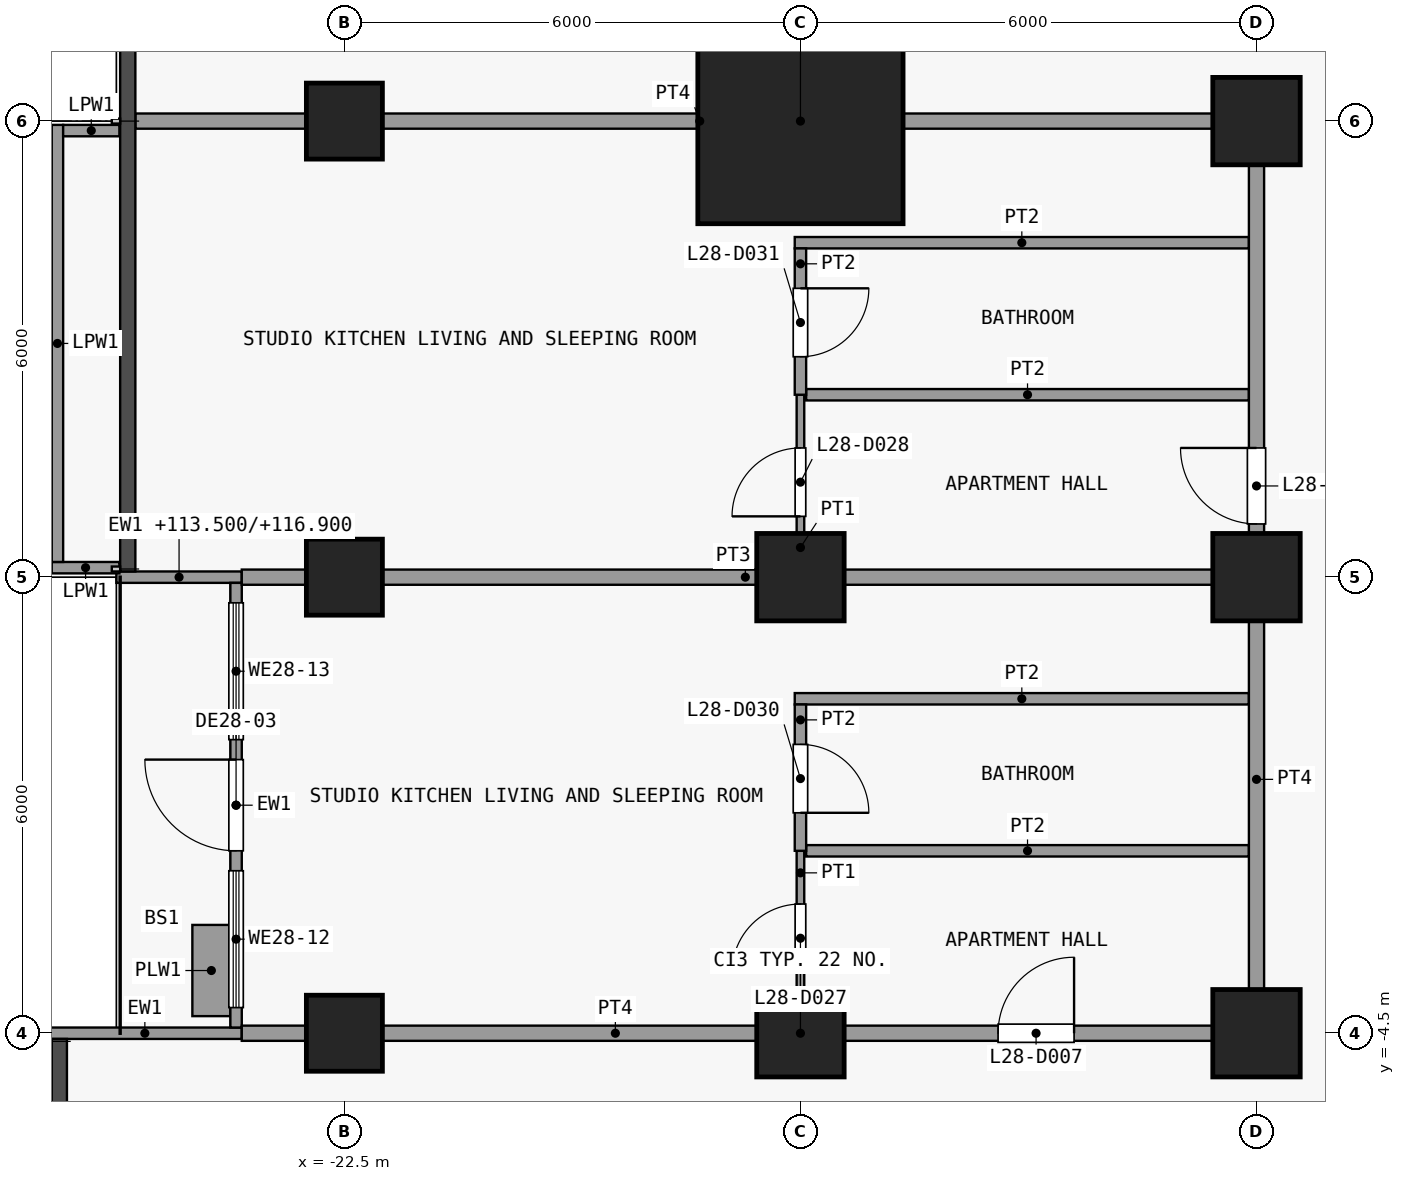
"""IFC4 building model, lengths in metres.
Left out: names, types, materials, properties, quantities, classifications, styles, units other than length and angle.
Written with IfcOpenShell. Run it as: python <this file> out.ifc"""

import sys

from ifc_helpers import new_model, si_unit, direction, frame, frame_2d, origin, origin_2d, place, context, subcontext, project, spatial, rectangle, extrude, element, fill, save


model = new_model("IFC4")
c1 = context("Model", 3, precision=1e-05, world=origin(), true_north=direction((0.0, 1.0)))
c2 = subcontext(c1, "Body", "Model", "MODEL_VIEW")
j1 = project(units=[si_unit("LENGTHUNIT", "METRE"), si_unit("PLANEANGLEUNIT", "RADIAN")], contexts=[c1])
p1 = place(None, origin())
s1 = spatial("IfcSite", under=j1, at=p1, CompositionType="ELEMENT")
p2 = place(p1, origin())
s2 = spatial("IfcBuilding", under=s1, at=p2, CompositionType="ELEMENT")
p3 = place(p2, frame((0.0, 0.0, 113.5)))
s3 = spatial("IfcBuildingStorey", under=s2, at=p3, CompositionType="ELEMENT", Elevation=113.5)
for number, where, z_axis, x_axis in (
    (1, (-22.5, -4.5, 0.0), (0.0, 0.0, 1.0), (1.0, 0.0, 0.0)),
    (2, (-22.5, 1.5, 0.0), (0.0, 0.0, 1.0), (1.0, 0.0, 0.0)),
    (3, (-22.5, 7.5, 0.0), (0.0, 0.0, 1.0), (1.0, 0.0, 0.0)),
):
    element("IfcColumn", number, at=place(p3, frame(where, z_axis=z_axis, x_axis=x_axis)), inside=s3, PredefinedType="COLUMN", context=c2, shape_type="SweptSolid", body=[
        extrude(rectangle(XDim=1.0, YDim=1.0, at=origin_2d()), origin(), (0.0, 0.0, 1.0), 3.6),
    ])
for number, where, z_axis, x_axis in (
    (4, (-16.5, -4.5, 0.0), (0.0, 0.0, 1.0), (1.0, 0.0, 0.0)),
    (5, (-16.5, 1.5, 0.0), (0.0, 0.0, 1.0), (1.0, 0.0, 0.0)),
):
    element("IfcColumn", number, at=place(p3, frame(where, z_axis=z_axis, x_axis=x_axis)), inside=s3, PredefinedType="COLUMN", context=c2, shape_type="SweptSolid", body=[
        extrude(rectangle(XDim=1.15, YDim=1.15, at=origin_2d()), origin(), (0.0, 0.0, 1.0), 3.6),
    ])
p4 = place(p3, frame((-16.5, 7.5, 0.0), z_axis=(0.0, 0.0, 1.0), x_axis=(1.0, 0.0, 0.0)))
e6 = element("IfcColumn", 6, at=p4, inside=s3, PredefinedType="COLUMN", context=c2, shape_type="SweptSolid", body=[
    extrude(rectangle(XDim=2.7, YDim=2.7, at=origin_2d()), origin(), (0.0, 0.0, 1.0), 3.6),
])
for number, where, z_axis, x_axis in (
    (7, (-10.5, -4.5, 0.0), (0.0, 0.0, 1.0), (1.0, 0.0, 0.0)),
    (8, (-10.5, 1.5, 0.0), (0.0, 0.0, 1.0), (1.0, 0.0, 0.0)),
    (9, (-10.5, 7.5, 0.0), (0.0, 0.0, 1.0), (1.0, 0.0, 0.0)),
):
    element("IfcColumn", number, at=place(p3, frame(where, z_axis=z_axis, x_axis=x_axis)), inside=s3, PredefinedType="COLUMN", context=c2, shape_type="SweptSolid", body=[
        extrude(rectangle(XDim=1.15, YDim=1.15, at=origin_2d()), origin(), (0.0, 0.0, 1.0), 3.6),
    ])
p5 = place(p3, frame((-23.85, -4.5, 0.0), z_axis=(0.0, 0.0, 1.0), x_axis=(-1.0, 0.0, 0.0)))
e10 = element("IfcWall", 10, at=p5, inside=s3, PredefinedType="SOLIDWALL", context=c2, shape_type="SweptSolid", body=[
    extrude(rectangle(XDim=2.55, YDim=0.15, at=frame_2d((1.275, 0.0))), origin(), (0.0, 0.0, 1.0), 3.3),
])
p6 = place(p3, frame((-23.85, 1.5, 0.0), z_axis=(0.0, 0.0, 1.0), x_axis=(-1.0, 0.0, 0.0)))
e11 = element("IfcWall", 11, at=p6, inside=s3, PredefinedType="SOLIDWALL", context=c2, shape_type="SweptSolid", body=[
    extrude(rectangle(XDim=1.65, YDim=0.15, at=frame_2d((0.825, 0.0))), origin(), (0.0, 0.0, 1.0), 3.4),
])
p7 = place(p3, frame((-23.925, -4.425, 0.0), z_axis=(0.0, 0.0, 1.0), x_axis=(0.0, 1.0, 0.0)))
e12 = element("IfcWall", 12, at=p7, inside=s3, PredefinedType="SOLIDWALL", context=c2, shape_type="SweptSolid", body=[
    extrude(rectangle(XDim=5.85, YDim=0.15, at=frame_2d((2.925, 0.0))), origin(), (0.0, 0.0, 1.0), 3.3),
])
p8 = place(p7, frame((2.325, 0.0, 0.0)))
e13 = element("IfcOpeningElement", 13, at=p8, cuts=e12, PredefinedType="OPENING", context=c2, shape_type="SweptSolid", body=[
    extrude(rectangle(XDim=1.2, YDim=2.4, at=frame_2d((0.6, 1.2))), frame((0.0, 0.085, 0.0), z_axis=(0.0, -1.0, 0.0), x_axis=(1.0, 0.0, 0.0)), (0.0, 0.0, 1.0), 0.17),
])
p9 = place(p7, frame((0.262, 0.0, 0.9)))
e14 = element("IfcOpeningElement", 14, at=p9, cuts=e12, PredefinedType="OPENING", context=c2, shape_type="SweptSolid", body=[
    extrude(rectangle(XDim=1.8, YDim=2.1, at=frame_2d((0.9, 1.05))), frame((0.0, 0.085, 0.0), z_axis=(0.0, -1.0, 0.0), x_axis=(1.0, 0.0, 0.0)), (0.0, 0.0, 1.0), 0.17),
])
p10 = place(p7, frame((3.788, 0.0, 0.9)))
e15 = element("IfcOpeningElement", 15, at=p10, cuts=e12, PredefinedType="OPENING", context=c2, shape_type="SweptSolid", body=[
    extrude(rectangle(XDim=1.8, YDim=2.1, at=frame_2d((0.9, 1.05))), frame((0.0, 0.085, 0.0), z_axis=(0.0, -1.0, 0.0), x_axis=(1.0, 0.0, 0.0)), (0.0, 0.0, 1.0), 0.17),
])
p11 = place(p3, frame((-24.25, -4.275, 0.0), z_axis=(0.0, 0.0, 1.0), x_axis=(0.0, 1.0, 0.0)))
e16 = element("IfcWall", 16, at=p11, inside=s3, PredefinedType="USERDEFINED", context=c2, shape_type="SweptSolid", body=[
    extrude(rectangle(XDim=1.2, YDim=0.5, at=frame_2d((0.6, 0.0))), origin(), (0.0, 0.0, 1.0), 0.9),
])
p12 = place(p3, frame((-25.46, 1.625, 0.0), z_axis=(0.0, 0.0, 1.0), x_axis=(-1.0, 0.0, 0.0)))
e17 = element("IfcWall", 17, at=p12, inside=s3, PredefinedType="PARAPET", context=c2, shape_type="SweptSolid", body=[
    extrude(rectangle(XDim=0.89, YDim=0.15, at=frame_2d((0.445, 0.0))), origin(), (0.0, 0.0, 1.0), 1.15),
])
p13 = place(p3, frame((-26.275, 1.7, 0.0), z_axis=(0.0, 0.0, 1.0), x_axis=(0.0, 1.0, 0.0)))
e18 = element("IfcWall", 18, at=p13, inside=s3, PredefinedType="PARAPET", context=c2, shape_type="SweptSolid", body=[
    extrude(rectangle(XDim=5.75, YDim=0.15, at=frame_2d((2.875, 0.0))), origin(), (0.0, 0.0, 1.0), 1.15),
])
p14 = place(p3, frame((-26.2, 7.375, 0.0), z_axis=(0.0, 0.0, 1.0), x_axis=(1.0, 0.0, 0.0)))
e19 = element("IfcWall", 19, at=p14, inside=s3, PredefinedType="PARAPET", context=c2, shape_type="SweptSolid", body=[
    extrude(rectangle(XDim=0.74, YDim=0.15, at=frame_2d((0.37, 0.0))), origin(), (0.0, 0.0, 1.0), 1.15),
])
p15 = place(p3, frame((-23.85, -4.5, 0.0), z_axis=(0.0, 0.0, 1.0), x_axis=(1.0, 0.0, 0.0)))
e20 = element("IfcWall", 20, at=p15, inside=s3, PredefinedType="PARTITIONING", context=c2, shape_type="SweptSolid", body=[
    extrude(rectangle(XDim=13.45, YDim=0.2, at=frame_2d((6.725, 0.0))), origin(), (0.0, 0.0, 1.0), 3.3),
])
p16 = place(p15, frame((9.95, 0.0, 0.0)))
e21 = element("IfcOpeningElement", 21, at=p16, cuts=e20, PredefinedType="OPENING", context=c2, shape_type="SweptSolid", body=[
    extrude(rectangle(XDim=1.0, YDim=2.1, at=frame_2d((0.5, 1.05))), frame((0.0, 0.11, 0.0), z_axis=(0.0, -1.0, 0.0), x_axis=(1.0, 0.0, 0.0)), (0.0, 0.0, 1.0), 0.22),
])
p17 = place(p3, frame((-16.425, -2.1, 0.0), z_axis=(0.0, 0.0, 1.0), x_axis=(1.0, 0.0, 0.0)))
e22 = element("IfcWall", 22, at=p17, inside=s3, PredefinedType="PARTITIONING", context=c2, shape_type="SweptSolid", body=[
    extrude(rectangle(XDim=5.825, YDim=0.15, at=frame_2d((2.913, 0.0))), origin(), (0.0, 0.0, 1.0), 3.3),
])
p18 = place(p3, frame((-16.575, -0.1, 0.0), z_axis=(0.0, 0.0, 1.0), x_axis=(1.0, 0.0, 0.0)))
e23 = element("IfcWall", 23, at=p18, inside=s3, PredefinedType="PARTITIONING", context=c2, shape_type="SweptSolid", body=[
    extrude(rectangle(XDim=5.975, YDim=0.15, at=frame_2d((2.987, 0.0))), origin(), (0.0, 0.0, 1.0), 3.3),
])
p19 = place(p3, frame((-23.85, 1.5, 0.0), z_axis=(0.0, 0.0, 1.0), x_axis=(1.0, 0.0, 0.0)))
e24 = element("IfcWall", 24, at=p19, inside=s3, PredefinedType="PARTITIONING", context=c2, shape_type="SweptSolid", body=[
    extrude(rectangle(XDim=13.25, YDim=0.2, at=frame_2d((6.625, 0.0))), origin(), (0.0, 0.0, 1.0), 3.3),
])
p20 = place(p3, frame((-16.425, 3.9, 0.0), z_axis=(0.0, 0.0, 1.0), x_axis=(1.0, 0.0, 0.0)))
e25 = element("IfcWall", 25, at=p20, inside=s3, PredefinedType="PARTITIONING", context=c2, shape_type="SweptSolid", body=[
    extrude(rectangle(XDim=5.825, YDim=0.15, at=frame_2d((2.913, 0.0))), origin(), (0.0, 0.0, 1.0), 3.3),
])
p21 = place(p3, frame((-16.575, 5.9, 0.0), z_axis=(0.0, 0.0, 1.0), x_axis=(1.0, 0.0, 0.0)))
e26 = element("IfcWall", 26, at=p21, inside=s3, PredefinedType="PARTITIONING", context=c2, shape_type="SweptSolid", body=[
    extrude(rectangle(XDim=5.975, YDim=0.15, at=frame_2d((2.987, 0.0))), origin(), (0.0, 0.0, 1.0), 3.3),
])
p22 = place(p3, frame((-25.25, 7.5, 0.0), z_axis=(0.0, 0.0, 1.0), x_axis=(1.0, 0.0, 0.0)))
e27 = element("IfcWall", 27, at=p22, inside=s3, PredefinedType="PARTITIONING", context=c2, shape_type="SweptSolid", body=[
    extrude(rectangle(XDim=14.85, YDim=0.2, at=frame_2d((7.425, 0.0))), origin(), (0.0, 0.0, 1.0), 3.3),
])
p23 = place(p3, frame((-16.5, -4.4, 0.0), z_axis=(0.0, 0.0, 1.0), x_axis=(0.0, 1.0, 0.0)))
e28 = element("IfcWall", 28, at=p23, inside=s3, PredefinedType="PARTITIONING", context=c2, shape_type="SweptSolid", body=[
    extrude(rectangle(XDim=2.3, YDim=0.1, at=frame_2d((1.15, 0.0))), origin(), (0.0, 0.0, 1.0), 3.3),
])
p24 = place(p23, frame((0.7, 0.0, 0.0)))
e29 = element("IfcOpeningElement", 29, at=p24, cuts=e28, PredefinedType="OPENING", context=c2, shape_type="SweptSolid", body=[
    extrude(rectangle(XDim=0.9, YDim=2.1, at=frame_2d((0.45, 1.05))), frame((0.0, 0.06, 0.0), z_axis=(0.0, -1.0, 0.0), x_axis=(1.0, 0.0, 0.0)), (0.0, 0.0, 1.0), 0.12),
])
p25 = place(p3, frame((-16.5, 1.6, 0.0), z_axis=(0.0, 0.0, 1.0), x_axis=(0.0, 1.0, 0.0)))
e30 = element("IfcWall", 30, at=p25, inside=s3, PredefinedType="PARTITIONING", context=c2, shape_type="SweptSolid", body=[
    extrude(rectangle(XDim=2.3, YDim=0.1, at=frame_2d((1.15, 0.0))), origin(), (0.0, 0.0, 1.0), 3.3),
])
p26 = place(p25, frame((0.7, 0.0, 0.0)))
e31 = element("IfcOpeningElement", 31, at=p26, cuts=e30, PredefinedType="OPENING", context=c2, shape_type="SweptSolid", body=[
    extrude(rectangle(XDim=0.9, YDim=2.1, at=frame_2d((0.45, 1.05))), frame((0.0, 0.06, 0.0), z_axis=(0.0, -1.0, 0.0), x_axis=(1.0, 0.0, 0.0)), (0.0, 0.0, 1.0), 0.12),
])
p27 = place(p3, frame((-16.5, -2.1, 0.0), z_axis=(0.0, 0.0, 1.0), x_axis=(0.0, 1.0, 0.0)))
e32 = element("IfcWall", 32, at=p27, inside=s3, PredefinedType="PARTITIONING", context=c2, shape_type="SweptSolid", body=[
    extrude(rectangle(XDim=1.925, YDim=0.15, at=frame_2d((0.962, 0.0))), origin(), (0.0, 0.0, 1.0), 3.3),
])
p28 = place(p27, frame((0.5, 0.0, 0.0)))
e33 = element("IfcOpeningElement", 33, at=p28, cuts=e32, PredefinedType="OPENING", context=c2, shape_type="SweptSolid", body=[
    extrude(rectangle(XDim=0.9, YDim=2.1, at=frame_2d((0.45, 1.05))), frame((0.0, 0.085, 0.0), z_axis=(0.0, -1.0, 0.0), x_axis=(1.0, 0.0, 0.0)), (0.0, 0.0, 1.0), 0.17),
])
p29 = place(p3, frame((-16.5, 3.9, 0.0), z_axis=(0.0, 0.0, 1.0), x_axis=(0.0, 1.0, 0.0)))
e34 = element("IfcWall", 34, at=p29, inside=s3, PredefinedType="PARTITIONING", context=c2, shape_type="SweptSolid", body=[
    extrude(rectangle(XDim=1.925, YDim=0.15, at=frame_2d((0.962, 0.0))), origin(), (0.0, 0.0, 1.0), 3.3),
])
p30 = place(p29, frame((0.5, 0.0, 0.0)))
e35 = element("IfcOpeningElement", 35, at=p30, cuts=e34, PredefinedType="OPENING", context=c2, shape_type="SweptSolid", body=[
    extrude(rectangle(XDim=0.9, YDim=2.1, at=frame_2d((0.45, 1.05))), frame((0.0, 0.085, 0.0), z_axis=(0.0, -1.0, 0.0), x_axis=(1.0, 0.0, 0.0)), (0.0, 0.0, 1.0), 0.17),
])
p31 = place(p3, frame((-10.5, -4.4, 0.0), z_axis=(0.0, 0.0, 1.0), x_axis=(0.0, 1.0, 0.0)))
e36 = element("IfcWall", 36, at=p31, inside=s3, PredefinedType="PARTITIONING", context=c2, shape_type="SweptSolid", body=[
    extrude(rectangle(XDim=11.8, YDim=0.2, at=frame_2d((5.9, 0.0))), origin(), (0.0, 0.0, 1.0), 3.3),
])
p32 = place(p31, frame((6.6, 0.0, 0.0)))
e37 = element("IfcOpeningElement", 37, at=p32, cuts=e36, PredefinedType="OPENING", context=c2, shape_type="SweptSolid", body=[
    extrude(rectangle(XDim=1.0, YDim=2.1, at=frame_2d((0.5, 1.05))), frame((0.0, 0.11, 0.0), z_axis=(0.0, -1.0, 0.0), x_axis=(1.0, 0.0, 0.0)), (0.0, 0.0, 1.0), 0.22),
])
p33 = place(p8, origin())
e38 = element("IfcDoor", 38, at=p33, inside=s3, OperationType="SINGLE_SWING_RIGHT", PredefinedType="DOOR", context=c2, shape_type="SweptSolid", body=[
    extrude(rectangle(XDim=1.2, YDim=2.4, at=frame_2d((0.6, 1.2))), frame((0.0, 0.025, 0.0), z_axis=(0.0, -1.0, 0.0), x_axis=(1.0, 0.0, 0.0)), (0.0, 0.0, 1.0), 0.05),
])
fill(e13, e38)
p34 = place(p9, origin())
e39 = element("IfcWindow", 39, at=p34, inside=s3, PartitioningType="SINGLE_PANEL", PredefinedType="WINDOW", context=c2, shape_type="SweptSolid", body=[
    extrude(rectangle(XDim=1.8, YDim=2.1, at=frame_2d((0.9, 1.05))), frame((0.0, 0.03, 0.0), z_axis=(0.0, -1.0, 0.0), x_axis=(1.0, 0.0, 0.0)), (0.0, 0.0, 1.0), 0.06),
])
fill(e14, e39)
p35 = place(p10, origin())
e40 = element("IfcWindow", 40, at=p35, inside=s3, PartitioningType="SINGLE_PANEL", PredefinedType="WINDOW", context=c2, shape_type="SweptSolid", body=[
    extrude(rectangle(XDim=1.8, YDim=2.1, at=frame_2d((0.9, 1.05))), frame((0.0, 0.03, 0.0), z_axis=(0.0, -1.0, 0.0), x_axis=(1.0, 0.0, 0.0)), (0.0, 0.0, 1.0), 0.06),
])
fill(e15, e40)
p36 = place(p16, origin())
e41 = element("IfcDoor", 41, at=p36, inside=s3, OperationType="SINGLE_SWING_LEFT", PredefinedType="DOOR", context=c2, shape_type="SweptSolid", body=[
    extrude(rectangle(XDim=1.0, YDim=2.1, at=frame_2d((0.5, 1.05))), frame((0.0, 0.025, 0.0), z_axis=(0.0, -1.0, 0.0), x_axis=(1.0, 0.0, 0.0)), (0.0, 0.0, 1.0), 0.05),
])
fill(e21, e41)
p37 = place(p24, origin())
e42 = element("IfcDoor", 42, at=p37, inside=s3, OperationType="SINGLE_SWING_RIGHT", PredefinedType="DOOR", context=c2, shape_type="SweptSolid", body=[
    extrude(rectangle(XDim=0.9, YDim=2.1, at=frame_2d((0.45, 1.05))), frame((0.0, 0.025, 0.0), z_axis=(0.0, -1.0, 0.0), x_axis=(1.0, 0.0, 0.0)), (0.0, 0.0, 1.0), 0.05),
])
fill(e29, e42)
p38 = place(p26, origin())
e43 = element("IfcDoor", 43, at=p38, inside=s3, OperationType="SINGLE_SWING_RIGHT", PredefinedType="DOOR", context=c2, shape_type="SweptSolid", body=[
    extrude(rectangle(XDim=0.9, YDim=2.1, at=frame_2d((0.45, 1.05))), frame((0.0, 0.025, 0.0), z_axis=(0.0, -1.0, 0.0), x_axis=(1.0, 0.0, 0.0)), (0.0, 0.0, 1.0), 0.05),
])
fill(e31, e43)
p39 = place(p28, origin())
e44 = element("IfcDoor", 44, at=p39, inside=s3, OperationType="SINGLE_SWING_LEFT", PredefinedType="DOOR", context=c2, shape_type="SweptSolid", body=[
    extrude(rectangle(XDim=0.9, YDim=2.1, at=frame_2d((0.45, 1.05))), frame((0.0, 0.025, 0.0), z_axis=(0.0, -1.0, 0.0), x_axis=(1.0, 0.0, 0.0)), (0.0, 0.0, 1.0), 0.05),
])
fill(e33, e44)
p40 = place(p30, origin())
e45 = element("IfcDoor", 45, at=p40, inside=s3, OperationType="SINGLE_SWING_RIGHT", PredefinedType="DOOR", context=c2, shape_type="SweptSolid", body=[
    extrude(rectangle(XDim=0.9, YDim=2.1, at=frame_2d((0.45, 1.05))), frame((0.0, 0.025, 0.0), z_axis=(0.0, -1.0, 0.0), x_axis=(1.0, 0.0, 0.0)), (0.0, 0.0, 1.0), 0.05),
])
fill(e35, e45)
p41 = place(p32, origin())
e46 = element("IfcDoor", 46, at=p41, inside=s3, OperationType="SINGLE_SWING_LEFT", PredefinedType="DOOR", context=c2, shape_type="SweptSolid", body=[
    extrude(rectangle(XDim=1.0, YDim=2.1, at=frame_2d((0.5, 1.05))), frame((0.0, 0.025, 0.0), z_axis=(0.0, -1.0, 0.0), x_axis=(1.0, 0.0, 0.0)), (0.0, 0.0, 1.0), 0.05),
])
fill(e37, e46)
save(model, sys.argv[1])
